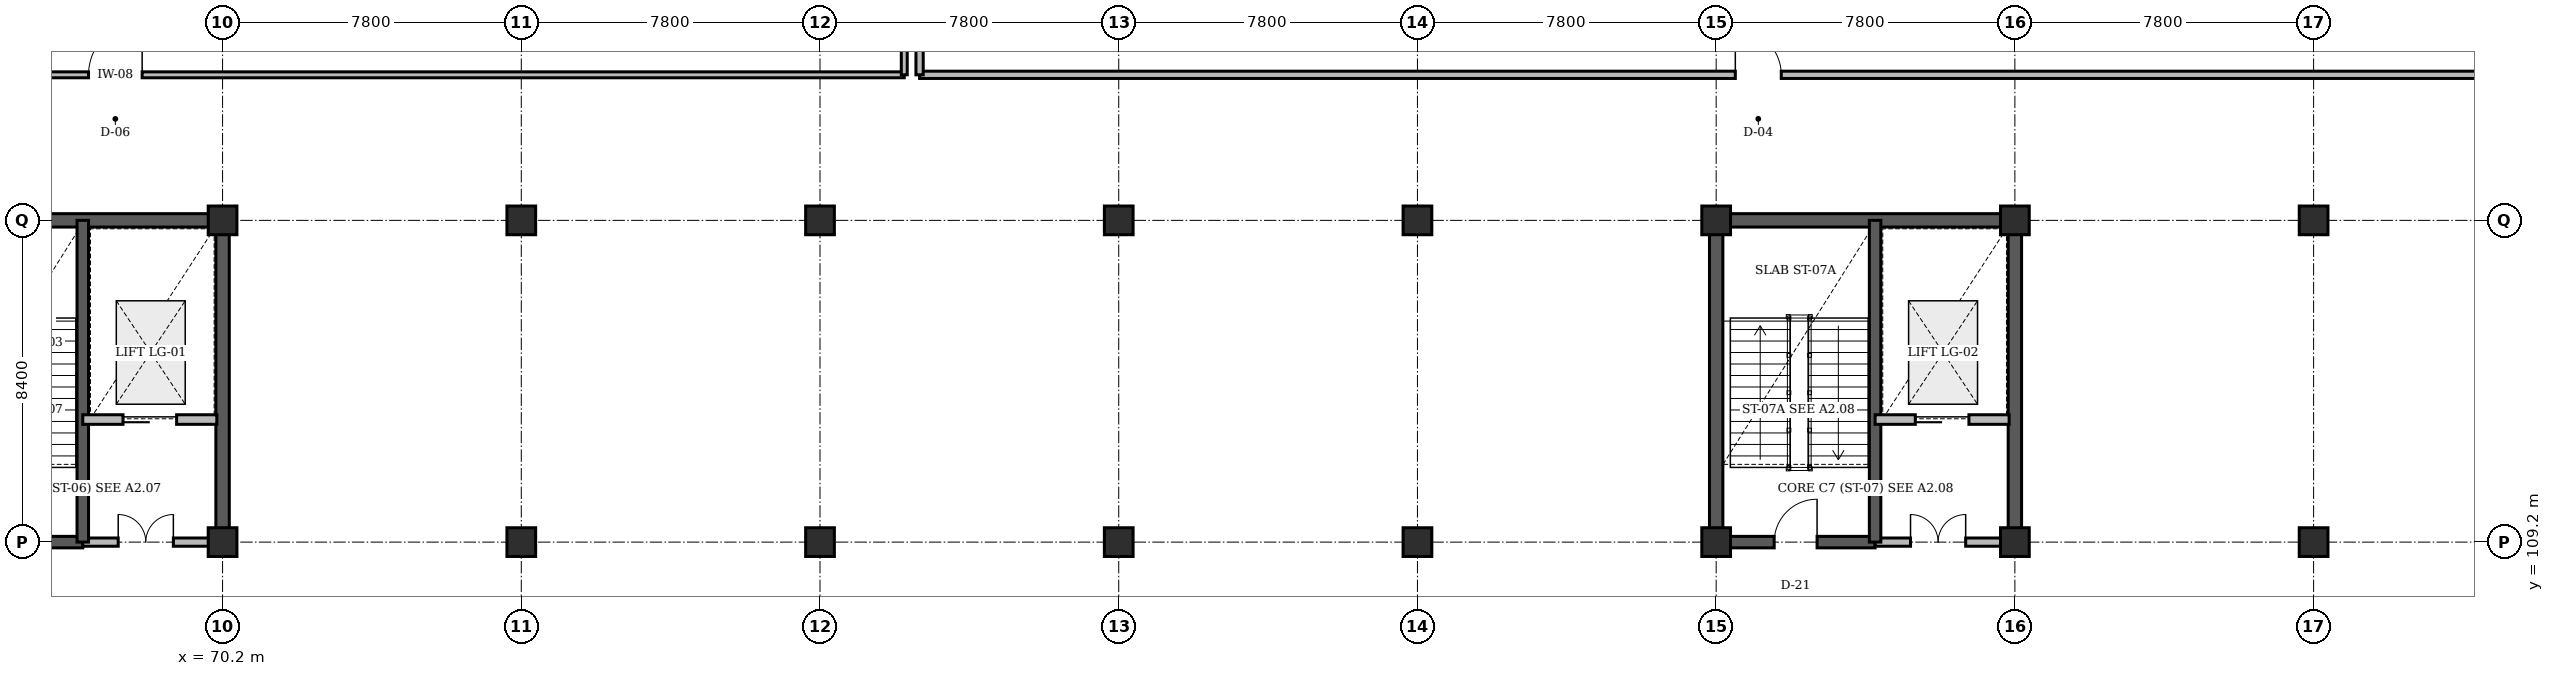
"""IFC4 building model, lengths in metres.
Left out: names, types, materials, properties, quantities, classifications, styles, units other than length and angle.
Written with IfcOpenShell. Run it as: python <this file> out.ifc"""

import sys

from ifc_helpers import new_model, si_unit, direction, frame, frame_2d, origin, origin_2d, place, context, subcontext, project, spatial, rectangle, extrude, element, fill, save


model = new_model("IFC4")
c1 = context("Model", 3, precision=1e-05, world=origin(), true_north=direction((0.0, 1.0)))
c2 = subcontext(c1, "Body", "Model", "MODEL_VIEW")
j1 = project(units=[si_unit("LENGTHUNIT", "METRE"), si_unit("PLANEANGLEUNIT", "RADIAN")], contexts=[c1])
p1 = place(None, origin())
s1 = spatial("IfcSite", under=j1, at=p1, CompositionType="ELEMENT")
p2 = place(p1, origin())
s2 = spatial("IfcBuilding", under=s1, at=p2, CompositionType="ELEMENT")
p3 = place(p2, frame((0.0, 0.0, 9.6)))
s3 = spatial("IfcBuildingStorey", under=s2, at=p3, CompositionType="ELEMENT", Elevation=9.6)
p4 = place(p3, frame((62.225, 117.6, 0.0), z_axis=(0.0, 0.0, 1.0), x_axis=(1.0, 0.0, 0.0)))
e1 = element("IfcWall", 1, at=p4, inside=s3, PredefinedType="SHEAR", context=c2, shape_type="SweptSolid", body=[
    extrude(rectangle(XDim=8.15, YDim=0.35, at=frame_2d((4.075, 0.0))), origin(), (0.0, 0.0, 1.0), 4.48),
])
p5 = place(p3, frame((70.2, 109.2, 0.0), z_axis=(0.0, 0.0, 1.0), x_axis=(0.0, 1.0, 0.0)))
e2 = element("IfcWall", 2, at=p5, inside=s3, PredefinedType="SHEAR", context=c2, shape_type="SweptSolid", body=[
    extrude(rectangle(XDim=8.4, YDim=0.35, at=frame_2d((4.2, 0.0))), origin(), (0.0, 0.0, 1.0), 4.48),
])
p6 = place(p3, frame((109.025, 117.6, 0.0), z_axis=(0.0, 0.0, 1.0), x_axis=(1.0, 0.0, 0.0)))
e3 = element("IfcWall", 3, at=p6, inside=s3, PredefinedType="SHEAR", context=c2, shape_type="SweptSolid", body=[
    extrude(rectangle(XDim=8.15, YDim=0.35, at=frame_2d((4.075, 0.0))), origin(), (0.0, 0.0, 1.0), 4.48),
])
for number, where, z_axis, x_axis in (
    (4, (109.2, 109.2, 0.0), (0.0, 0.0, 1.0), (0.0, 1.0, 0.0)),
    (5, (117.0, 109.2, 0.0), (0.0, 0.0, 1.0), (0.0, 1.0, 0.0)),
):
    element("IfcWall", number, at=place(p3, frame(where, z_axis=z_axis, x_axis=x_axis)), inside=s3, PredefinedType="SHEAR", context=c2, shape_type="SweptSolid", body=[
        extrude(rectangle(XDim=8.4, YDim=0.35, at=frame_2d((4.2, 0.0))), origin(), (0.0, 0.0, 1.0), 4.48),
    ])
for number, where, z_axis, x_axis in (
    (6, (70.2, 109.2, 0.0), (0.0, 0.0, 1.0), (1.0, 0.0, 0.0)),
    (7, (70.2, 117.6, 0.0), (0.0, 0.0, 1.0), (1.0, 0.0, 0.0)),
    (8, (78.0, 109.2, 0.0), (0.0, 0.0, 1.0), (1.0, 0.0, 0.0)),
    (9, (78.0, 117.6, 0.0), (0.0, 0.0, 1.0), (1.0, 0.0, 0.0)),
    (10, (85.8, 109.2, 0.0), (0.0, 0.0, 1.0), (1.0, 0.0, 0.0)),
    (11, (85.8, 117.6, 0.0), (0.0, 0.0, 1.0), (1.0, 0.0, 0.0)),
    (12, (93.6, 109.2, 0.0), (0.0, 0.0, 1.0), (1.0, 0.0, 0.0)),
    (13, (93.6, 117.6, 0.0), (0.0, 0.0, 1.0), (1.0, 0.0, 0.0)),
    (14, (101.4, 109.2, 0.0), (0.0, 0.0, 1.0), (1.0, 0.0, 0.0)),
    (15, (101.4, 117.6, 0.0), (0.0, 0.0, 1.0), (1.0, 0.0, 0.0)),
    (16, (109.2, 109.2, 0.0), (0.0, 0.0, 1.0), (1.0, 0.0, 0.0)),
    (17, (109.2, 117.6, 0.0), (0.0, 0.0, 1.0), (1.0, 0.0, 0.0)),
    (18, (117.0, 109.2, 0.0), (0.0, 0.0, 1.0), (1.0, 0.0, 0.0)),
    (19, (117.0, 117.6, 0.0), (0.0, 0.0, 1.0), (1.0, 0.0, 0.0)),
    (20, (124.8, 109.2, 0.0), (0.0, 0.0, 1.0), (1.0, 0.0, 0.0)),
    (21, (124.8, 117.6, 0.0), (0.0, 0.0, 1.0), (1.0, 0.0, 0.0)),
):
    element("IfcColumn", number, at=place(p3, frame(where, z_axis=z_axis, x_axis=x_axis)), inside=s3, PredefinedType="COLUMN", context=c2, shape_type="SweptSolid", body=[
        extrude(rectangle(XDim=0.75, YDim=0.75, at=origin_2d()), origin(), (0.0, 0.0, 1.0), 4.8),
    ])
p7 = place(p3, frame((62.4, 109.2, 0.0), z_axis=(0.0, 0.0, 1.0), x_axis=(1.0, 0.0, 0.0)))
e22 = element("IfcWall", 22, at=p7, inside=s3, PredefinedType="SHEAR", context=c2, shape_type="SweptSolid", body=[
    extrude(rectangle(XDim=4.15, YDim=0.3, at=frame_2d((2.075, 0.0))), origin(), (0.0, 0.0, 1.0), 4.8),
])
p8 = place(p7, frame((1.515, 0.0, 0.0)))
e23 = element("IfcOpeningElement", 23, at=p8, cuts=e22, PredefinedType="OPENING", context=c2, shape_type="SweptSolid", body=[
    extrude(rectangle(XDim=1.12, YDim=2.15, at=frame_2d((0.56, 1.075))), frame((0.0, 0.16, 0.0), z_axis=(0.0, -1.0, 0.0), x_axis=(1.0, 0.0, 0.0)), (0.0, 0.0, 1.0), 0.32),
])
p9 = place(p3, frame((66.55, 109.2, 0.0), z_axis=(0.0, 0.0, 1.0), x_axis=(1.0, 0.0, 0.0)))
e24 = element("IfcWall", 24, at=p9, inside=s3, PredefinedType="STANDARD", context=c2, shape_type="SweptSolid", body=[
    extrude(rectangle(XDim=3.29, YDim=0.215, at=frame_2d((1.645, 0.0))), origin(), (0.0, 0.0, 1.0), 3.73),
])
p10 = place(p9, frame((0.925, 0.0, 0.0)))
e25 = element("IfcOpeningElement", 25, at=p10, cuts=e24, PredefinedType="OPENING", context=c2, shape_type="SweptSolid", body=[
    extrude(rectangle(XDim=1.44, YDim=2.2, at=frame_2d((0.72, 1.1))), frame((0.0, 0.118, 0.0), z_axis=(0.0, -1.0, 0.0), x_axis=(1.0, 0.0, 0.0)), (0.0, 0.0, 1.0), 0.235),
])
p11 = place(p3, frame((66.55, 109.2, 0.0), z_axis=(0.0, 0.0, 1.0), x_axis=(0.0, 1.0, 0.0)))
e26 = element("IfcWall", 26, at=p11, inside=s3, PredefinedType="SHEAR", context=c2, shape_type="SweptSolid", body=[
    extrude(rectangle(XDim=8.4, YDim=0.3, at=frame_2d((4.2, 0.0))), origin(), (0.0, 0.0, 1.0), 4.8),
])
p12 = place(p3, frame((66.55, 112.4, 0.0), z_axis=(0.0, 0.0, 1.0), x_axis=(1.0, 0.0, 0.0)))
e27 = element("IfcWall", 27, at=p12, inside=s3, PredefinedType="STANDARD", context=c2, shape_type="SweptSolid", body=[
    extrude(rectangle(XDim=3.5, YDim=0.25, at=frame_2d((1.75, 0.0))), origin(), (0.0, 0.0, 1.0), 4.46),
])
p13 = place(p12, frame((1.05, 0.0, 0.0)))
e28 = element("IfcOpeningElement", 28, at=p13, cuts=e27, PredefinedType="OPENING", context=c2, shape_type="SweptSolid", body=[
    extrude(rectangle(XDim=1.4, YDim=2.2, at=frame_2d((0.7, 1.1))), frame((0.0, 0.135, 0.0), z_axis=(0.0, -1.0, 0.0), x_axis=(1.0, 0.0, 0.0)), (0.0, 0.0, 1.0), 0.27),
])
p14 = place(p3, frame((109.2, 109.2, 0.0), z_axis=(0.0, 0.0, 1.0), x_axis=(1.0, 0.0, 0.0)))
e29 = element("IfcWall", 29, at=p14, inside=s3, PredefinedType="SHEAR", context=c2, shape_type="SweptSolid", body=[
    extrude(rectangle(XDim=4.15, YDim=0.3, at=frame_2d((2.075, 0.0))), origin(), (0.0, 0.0, 1.0), 4.8),
])
p15 = place(p14, frame((1.515, 0.0, 0.0)))
e30 = element("IfcOpeningElement", 30, at=p15, cuts=e29, PredefinedType="OPENING", context=c2, shape_type="SweptSolid", body=[
    extrude(rectangle(XDim=1.12, YDim=2.15, at=frame_2d((0.56, 1.075))), frame((0.0, 0.16, 0.0), z_axis=(0.0, -1.0, 0.0), x_axis=(1.0, 0.0, 0.0)), (0.0, 0.0, 1.0), 0.32),
])
p16 = place(p3, frame((113.35, 109.2, 0.0), z_axis=(0.0, 0.0, 1.0), x_axis=(1.0, 0.0, 0.0)))
e31 = element("IfcWall", 31, at=p16, inside=s3, PredefinedType="STANDARD", context=c2, shape_type="SweptSolid", body=[
    extrude(rectangle(XDim=3.29, YDim=0.215, at=frame_2d((1.645, 0.0))), origin(), (0.0, 0.0, 1.0), 3.73),
])
p17 = place(p16, frame((0.925, 0.0, 0.0)))
e32 = element("IfcOpeningElement", 32, at=p17, cuts=e31, PredefinedType="OPENING", context=c2, shape_type="SweptSolid", body=[
    extrude(rectangle(XDim=1.44, YDim=2.2, at=frame_2d((0.72, 1.1))), frame((0.0, 0.118, 0.0), z_axis=(0.0, -1.0, 0.0), x_axis=(1.0, 0.0, 0.0)), (0.0, 0.0, 1.0), 0.235),
])
p18 = place(p3, frame((113.35, 109.2, 0.0), z_axis=(0.0, 0.0, 1.0), x_axis=(0.0, 1.0, 0.0)))
e33 = element("IfcWall", 33, at=p18, inside=s3, PredefinedType="SHEAR", context=c2, shape_type="SweptSolid", body=[
    extrude(rectangle(XDim=8.4, YDim=0.3, at=frame_2d((4.2, 0.0))), origin(), (0.0, 0.0, 1.0), 4.8),
])
p19 = place(p3, frame((113.35, 112.4, 0.0), z_axis=(0.0, 0.0, 1.0), x_axis=(1.0, 0.0, 0.0)))
e34 = element("IfcWall", 34, at=p19, inside=s3, PredefinedType="STANDARD", context=c2, shape_type="SweptSolid", body=[
    extrude(rectangle(XDim=3.5, YDim=0.25, at=frame_2d((1.75, 0.0))), origin(), (0.0, 0.0, 1.0), 4.46),
])
p20 = place(p19, frame((1.05, 0.0, 0.0)))
e35 = element("IfcOpeningElement", 35, at=p20, cuts=e34, PredefinedType="OPENING", context=c2, shape_type="SweptSolid", body=[
    extrude(rectangle(XDim=1.4, YDim=2.2, at=frame_2d((0.7, 1.1))), frame((0.0, 0.135, 0.0), z_axis=(0.0, -1.0, 0.0), x_axis=(1.0, 0.0, 0.0)), (0.0, 0.0, 1.0), 0.27),
])
p21 = place(p3, frame((46.8, 121.4, 0.0), z_axis=(0.0, 0.0, 1.0), x_axis=(1.0, 0.0, 0.0)))
e36 = element("IfcWall", 36, at=p21, inside=s3, PredefinedType="PARTITIONING", context=c2, shape_type="SweptSolid", body=[
    extrude(rectangle(XDim=41.2, YDim=0.155, at=frame_2d((20.6, 0.0))), origin(), (0.0, 0.0, 1.0), 4.46),
])
p22 = place(p21, frame((19.9, 0.0, 0.0)))
e37 = element("IfcOpeningElement", 37, at=p22, cuts=e36, PredefinedType="OPENING", context=c2, shape_type="SweptSolid", body=[
    extrude(rectangle(XDim=1.4, YDim=2.2, at=frame_2d((0.7, 1.1))), frame((0.0, 0.087, 0.0), z_axis=(0.0, -1.0, 0.0), x_axis=(1.0, 0.0, 0.0)), (0.0, 0.0, 1.0), 0.175),
])
p23 = place(p3, frame((88.0, 121.4, 0.0), z_axis=(0.0, 0.0, 1.0), x_axis=(0.0, 1.0, 0.0)))
e38 = element("IfcWall", 38, at=p23, inside=s3, PredefinedType="PARTITIONING", context=c2, shape_type="SweptSolid", body=[
    extrude(rectangle(XDim=12.4, YDim=0.155, at=frame_2d((6.2, 0.0))), origin(), (0.0, 0.0, 1.0), 4.46),
])
p24 = place(p3, frame((88.4, 121.4, 0.0), z_axis=(0.0, 0.0, 1.0), x_axis=(1.0, 0.0, 0.0)))
e39 = element("IfcWall", 39, at=p24, inside=s3, PredefinedType="PARTITIONING", context=c2, shape_type="SweptSolid", body=[
    extrude(rectangle(XDim=43.8, YDim=0.19, at=frame_2d((21.9, 0.0))), origin(), (0.0, 0.0, 1.0), 4.46),
])
p25 = place(p24, frame((21.3, 0.0, 0.0)))
e40 = element("IfcOpeningElement", 40, at=p25, cuts=e39, PredefinedType="OPENING", context=c2, shape_type="SweptSolid", body=[
    extrude(rectangle(XDim=1.2, YDim=2.2, at=frame_2d((0.6, 1.1))), frame((0.0, 0.105, 0.0), z_axis=(0.0, -1.0, 0.0), x_axis=(1.0, 0.0, 0.0)), (0.0, 0.0, 1.0), 0.21),
])
p26 = place(p3, frame((88.4, 121.4, 0.0), z_axis=(0.0, 0.0, 1.0), x_axis=(0.0, 1.0, 0.0)))
e41 = element("IfcWall", 41, at=p26, inside=s3, PredefinedType="PARTITIONING", context=c2, shape_type="SweptSolid", body=[
    extrude(rectangle(XDim=12.4, YDim=0.19, at=frame_2d((6.2, 0.0))), origin(), (0.0, 0.0, 1.0), 4.46),
])
p27 = place(p10, origin())
e42 = element("IfcDoor", 42, at=p27, inside=s3, OperationType="DOUBLE_DOOR_SINGLE_SWING", PredefinedType="DOOR", context=c2, shape_type="SweptSolid", body=[
    extrude(rectangle(XDim=1.44, YDim=2.2, at=frame_2d((0.72, 1.1))), frame((0.0, 0.025, 0.0), z_axis=(0.0, -1.0, 0.0), x_axis=(1.0, 0.0, 0.0)), (0.0, 0.0, 1.0), 0.05),
])
fill(e25, e42)
p28 = place(p13, origin())
e43 = element("IfcDoor", 43, at=p28, inside=s3, OperationType="SLIDING_TO_LEFT", PredefinedType="DOOR", context=c2, shape_type="SweptSolid", body=[
    extrude(rectangle(XDim=1.4, YDim=2.2, at=frame_2d((0.7, 1.1))), frame((0.0, 0.025, 0.0), z_axis=(0.0, -1.0, 0.0), x_axis=(1.0, 0.0, 0.0)), (0.0, 0.0, 1.0), 0.05),
])
fill(e28, e43)
p29 = place(p15, origin())
e44 = element("IfcDoor", 44, at=p29, inside=s3, OperationType="SINGLE_SWING_RIGHT", PredefinedType="DOOR", context=c2, shape_type="SweptSolid", body=[
    extrude(rectangle(XDim=1.12, YDim=2.15, at=frame_2d((0.56, 1.075))), frame((0.0, 0.025, 0.0), z_axis=(0.0, -1.0, 0.0), x_axis=(1.0, 0.0, 0.0)), (0.0, 0.0, 1.0), 0.05),
])
fill(e30, e44)
p30 = place(p17, origin())
e45 = element("IfcDoor", 45, at=p30, inside=s3, OperationType="DOUBLE_DOOR_SINGLE_SWING", PredefinedType="DOOR", context=c2, shape_type="SweptSolid", body=[
    extrude(rectangle(XDim=1.44, YDim=2.2, at=frame_2d((0.72, 1.1))), frame((0.0, 0.025, 0.0), z_axis=(0.0, -1.0, 0.0), x_axis=(1.0, 0.0, 0.0)), (0.0, 0.0, 1.0), 0.05),
])
fill(e32, e45)
p31 = place(p20, origin())
e46 = element("IfcDoor", 46, at=p31, inside=s3, OperationType="SLIDING_TO_LEFT", PredefinedType="DOOR", context=c2, shape_type="SweptSolid", body=[
    extrude(rectangle(XDim=1.4, YDim=2.2, at=frame_2d((0.7, 1.1))), frame((0.0, 0.025, 0.0), z_axis=(0.0, -1.0, 0.0), x_axis=(1.0, 0.0, 0.0)), (0.0, 0.0, 1.0), 0.05),
])
fill(e35, e46)
p32 = place(p22, origin())
e47 = element("IfcDoor", 47, at=p32, inside=s3, OperationType="SINGLE_SWING_RIGHT", PredefinedType="DOOR", context=c2, shape_type="SweptSolid", body=[
    extrude(rectangle(XDim=1.4, YDim=2.2, at=frame_2d((0.7, 1.1))), frame((0.0, 0.025, 0.0), z_axis=(0.0, -1.0, 0.0), x_axis=(1.0, 0.0, 0.0)), (0.0, 0.0, 1.0), 0.05),
])
fill(e37, e47)
p33 = place(p25, origin())
e48 = element("IfcDoor", 48, at=p33, inside=s3, OperationType="SINGLE_SWING_LEFT", PredefinedType="DOOR", context=c2, shape_type="SweptSolid", body=[
    extrude(rectangle(XDim=1.2, YDim=2.2, at=frame_2d((0.6, 1.1))), frame((0.0, 0.025, 0.0), z_axis=(0.0, -1.0, 0.0), x_axis=(1.0, 0.0, 0.0)), (0.0, 0.0, 1.0), 0.05),
])
fill(e40, e48)
save(model, sys.argv[1])
